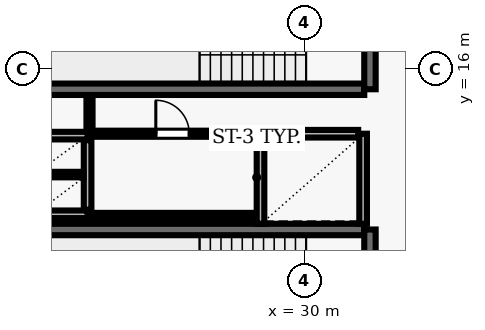
"""IFC4 building model, lengths in metres.
Left out: names, types, materials, properties, quantities, classifications, styles, units other than length and angle.
Written with IfcOpenShell. Run it as: python <this file> out.ifc"""

import sys

from ifc_helpers import new_model, si_unit, direction, frame, frame_2d, origin, place, context, subcontext, project, spatial, rectangle, extrude, element, fill, save


model = new_model("IFC4")
c1 = context("Model", 3, precision=1e-05, world=origin(), true_north=direction((0.0, 1.0)))
c2 = subcontext(c1, "Body", "Model", "MODEL_VIEW")
j1 = project(units=[si_unit("LENGTHUNIT", "METRE"), si_unit("PLANEANGLEUNIT", "RADIAN")], contexts=[c1])
p1 = place(None, origin())
s1 = spatial("IfcSite", under=j1, at=p1, CompositionType="ELEMENT")
p2 = place(p1, origin())
s2 = spatial("IfcBuilding", under=s1, at=p2, CompositionType="ELEMENT")
p3 = place(p2, frame((0.0, 0.0, 103.4)))
s3 = spatial("IfcBuildingStorey", under=s2, at=p3, CompositionType="ELEMENT", Elevation=103.4)
p4 = place(p3, frame((23.22, 15.47, 0.0), z_axis=(0.0, 0.0, 1.0), x_axis=(1.0, 0.0, 0.0)))
e1 = element("IfcWall", 1, at=p4, inside=s3, PredefinedType="SHEAR", context=c2, shape_type="SweptSolid", body=[
    extrude(rectangle(XDim=8.36, YDim=0.3, at=frame_2d((4.18, 0.0))), origin(), (0.0, 0.0, 1.0), 3.69),
])
p5 = place(p3, frame((31.73, 15.47, 0.0), z_axis=(0.0, 0.0, 1.0), x_axis=(0.0, 1.0, 0.0)))
e2 = element("IfcWall", 2, at=p5, inside=s3, PredefinedType="SHEAR", context=c2, shape_type="SweptSolid", body=[
    extrude(rectangle(XDim=3.51, YDim=0.3, at=frame_2d((1.755, 0.0))), origin(), (0.0, 0.0, 1.0), 3.69),
])
p6 = place(p5, frame((1.18, 0.0, 0.0)))
e3 = element("IfcOpeningElement", 3, at=p6, cuts=e2, PredefinedType="OPENING", context=c2, shape_type="SweptSolid", body=[
    extrude(rectangle(XDim=1.15, YDim=2.15, at=frame_2d((0.575, 1.075))), frame((0.0, 0.16, 0.0), z_axis=(0.0, -1.0, 0.0), x_axis=(1.0, 0.0, 0.0)), (0.0, 0.0, 1.0), 0.32),
])
p7 = place(p3, frame((31.58, 11.78, 0.0), z_axis=(0.0, 0.0, 1.0), x_axis=(-1.0, 0.0, 0.0)))
e4 = element("IfcWall", 4, at=p7, inside=s3, PredefinedType="SHEAR", context=c2, shape_type="SweptSolid", body=[
    extrude(rectangle(XDim=8.36, YDim=0.3, at=frame_2d((4.18, 0.0))), origin(), (0.0, 0.0, 1.0), 3.69),
])
p8 = place(p3, frame((31.73, 8.27, 0.0), z_axis=(0.0, 0.0, 1.0), x_axis=(0.0, 1.0, 0.0)))
e5 = element("IfcWall", 5, at=p8, inside=s3, PredefinedType="SHEAR", context=c2, shape_type="SweptSolid", body=[
    extrude(rectangle(XDim=3.51, YDim=0.3, at=frame_2d((1.755, 0.0))), origin(), (0.0, 0.0, 1.0), 3.69),
])
p9 = place(p8, frame((1.18, 0.0, 0.0)))
e6 = element("IfcOpeningElement", 6, at=p9, cuts=e5, PredefinedType="OPENING", context=c2, shape_type="SweptSolid", body=[
    extrude(rectangle(XDim=1.15, YDim=2.15, at=frame_2d((0.575, 1.075))), frame((0.0, 0.16, 0.0), z_axis=(0.0, -1.0, 0.0), x_axis=(1.0, 0.0, 0.0)), (0.0, 0.0, 1.0), 0.32),
])
for number, where, z_axis, x_axis in (
    (7, (28.85, 14.3, 0.0), (0.0, 0.0, 1.0), (0.0, -1.0, 0.0)),
    (8, (31.55, 11.93, 0.0), (0.0, 0.0, 1.0), (0.0, 1.0, 0.0)),
):
    element("IfcWall", number, at=place(p3, frame(where, z_axis=z_axis, x_axis=x_axis)), inside=s3, PredefinedType="SOLIDWALL", context=c2, shape_type="SweptSolid", body=[
        extrude(rectangle(XDim=2.37, YDim=0.2, at=frame_2d((1.185, 0.0))), origin(), (0.0, 0.0, 1.0), 3.69),
    ])
p10 = place(p3, frame((31.42, 14.3, 0.0), z_axis=(0.0, 0.0, 1.0), x_axis=(-1.0, 0.0, 0.0)))
e9 = element("IfcWall", 9, at=p10, inside=s3, PredefinedType="SOLIDWALL", context=c2, shape_type="SweptSolid", body=[
    extrude(rectangle(XDim=2.44, YDim=0.2, at=frame_2d((1.22, 0.0))), origin(), (0.0, 0.0, 1.0), 3.69),
])
for number, where, z_axis, x_axis in (
    (10, (22.9, 14.25, 0.0), (0.0, 0.0, 1.0), (1.0, 0.0, 0.0)),
    (11, (22.9, 12.18, 0.0), (0.0, 0.0, 1.0), (1.0, 0.0, 0.0)),
):
    element("IfcWall", number, at=place(p3, frame(where, z_axis=z_axis, x_axis=x_axis)), inside=s3, PredefinedType="SOLIDWALL", context=c2, shape_type="SweptSolid", body=[
        extrude(rectangle(XDim=1.4, YDim=0.2, at=frame_2d((0.7, 0.0))), origin(), (0.0, 0.0, 1.0), 3.69),
    ])
p11 = place(p3, frame((24.3, 12.3, 0.0), z_axis=(0.0, 0.0, 1.0), x_axis=(0.0, 1.0, 0.0)))
e12 = element("IfcWall", 12, at=p11, inside=s3, PredefinedType="SOLIDWALL", context=c2, shape_type="SweptSolid", body=[
    extrude(rectangle(XDim=1.83, YDim=0.2, at=frame_2d((0.915, 0.0))), origin(), (0.0, 0.0, 1.0), 3.69),
])
p12 = place(p3, frame((23.01, 13.225, 0.0), z_axis=(0.0, 0.0, 1.0), x_axis=(1.0, 0.0, 0.0)))
e13 = element("IfcWall", 13, at=p12, inside=s3, PredefinedType="PARTITIONING", context=c2, shape_type="SweptSolid", body=[
    extrude(rectangle(XDim=1.18, YDim=0.145, at=frame_2d((0.59, 0.0))), origin(), (0.0, 0.0, 1.0), 3.69),
])
p13 = place(p3, frame((24.35, 12.15, 0.0), z_axis=(0.0, 0.0, 1.0), x_axis=(1.0, 0.0, 0.0)))
e14 = element("IfcWall", 14, at=p13, inside=s3, PredefinedType="PARTITIONING", context=c2, shape_type="SweptSolid", body=[
    extrude(rectangle(XDim=4.37, YDim=0.135, at=frame_2d((2.185, 0.0))), origin(), (0.0, 0.0, 1.0), 3.69),
])
p14 = place(p3, frame((24.35, 14.3, 0.0), z_axis=(0.0, 0.0, 1.0), x_axis=(1.0, 0.0, 0.0)))
e15 = element("IfcWall", 15, at=p14, inside=s3, PredefinedType="PARTITIONING", context=c2, shape_type="SweptSolid", body=[
    extrude(rectangle(XDim=4.37, YDim=0.16, at=frame_2d((2.185, 0.0))), origin(), (0.0, 0.0, 1.0), 3.69),
])
p15 = place(p14, frame((1.745, 0.0, 0.0)))
e16 = element("IfcOpeningElement", 16, at=p15, cuts=e15, PredefinedType="OPENING", context=c2, shape_type="SweptSolid", body=[
    extrude(rectangle(XDim=0.88, YDim=2.1, at=frame_2d((0.44, 1.05))), frame((0.0, 0.09, 0.0), z_axis=(0.0, -1.0, 0.0), x_axis=(1.0, 0.0, 0.0)), (0.0, 0.0, 1.0), 0.18),
])
p16 = place(p3, frame((24.35, 15.29, 0.0), z_axis=(0.0, 0.0, 1.0), x_axis=(0.0, -1.0, 0.0)))
e17 = element("IfcWall", 17, at=p16, inside=s3, PredefinedType="PARTITIONING", context=c2, shape_type="SweptSolid", body=[
    extrude(rectangle(XDim=0.915, YDim=0.16, at=frame_2d((0.458, 0.0))), origin(), (0.0, 0.0, 1.0), 3.69),
])
p17 = place(p15, origin())
e18 = element("IfcDoor", 18, at=p17, inside=s3, OperationType="SINGLE_SWING_LEFT", PredefinedType="DOOR", context=c2, shape_type="SweptSolid", body=[
    extrude(rectangle(XDim=0.88, YDim=2.1, at=frame_2d((0.44, 1.05))), frame((0.0, 0.025, 0.0), z_axis=(0.0, -1.0, 0.0), x_axis=(1.0, 0.0, 0.0)), (0.0, 0.0, 1.0), 0.05),
])
fill(e16, e18)
save(model, sys.argv[1])
